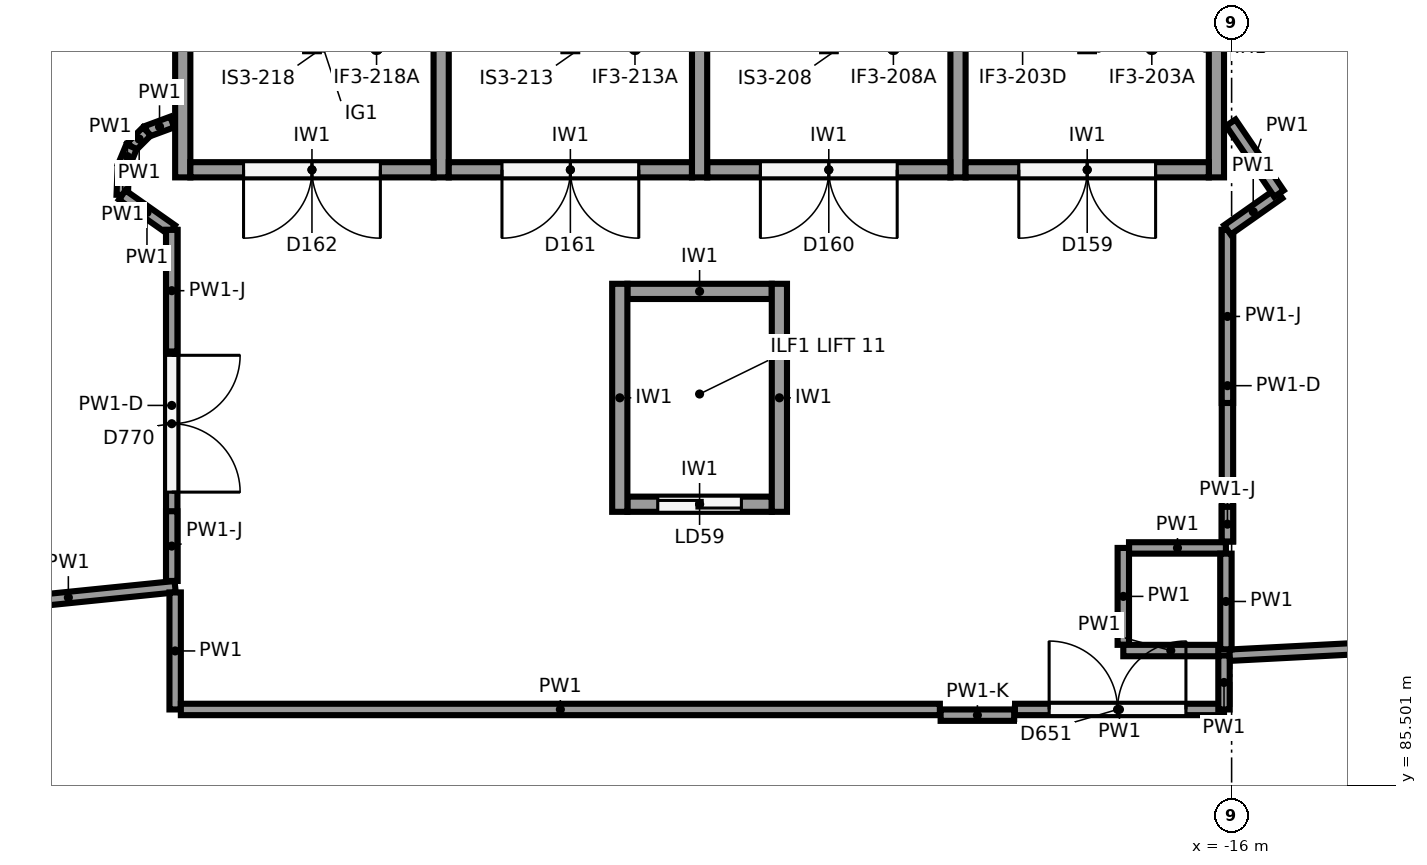
"""IFC4 building model, lengths in metres.
Left out: names, types, materials, properties, quantities, classifications, styles, units other than length and angle.
Written with IfcOpenShell. Run it as: python <this file> out.ifc"""

import sys

from ifc_helpers import new_model, si_unit, direction, frame, frame_2d, origin, origin_2d, place, context, subcontext, project, spatial, rectangle, circle, extrude, element, fill, save


model = new_model("IFC4")
c1 = context("Model", 3, precision=1e-05, world=origin(), true_north=direction((0.0, 1.0)))
c2 = subcontext(c1, "Body", "Model", "MODEL_VIEW")
j1 = project(units=[si_unit("LENGTHUNIT", "METRE"), si_unit("PLANEANGLEUNIT", "RADIAN")], contexts=[c1])
p1 = place(None, origin())
s1 = spatial("IfcSite", under=j1, at=p1, CompositionType="ELEMENT")
p2 = place(p1, origin())
s2 = spatial("IfcBuilding", under=s1, at=p2, CompositionType="ELEMENT")
p3 = place(p2, frame((0.0, 0.0, 6.5)))
s3 = spatial("IfcBuildingStorey", under=s2, at=p3, CompositionType="ELEMENT", Elevation=6.5)
p4 = place(p3, frame((-19.119, 85.698, 0.0), z_axis=(0.0, 0.0, 1.0), x_axis=(1.0, 0.0, 0.0)))
e1 = element("IfcColumn", 1, at=p4, inside=s3, PredefinedType="COLUMN", context=c2, shape_type="SweptSolid", body=[
    extrude(circle(Radius=0.4, at=origin_2d()), origin(), (0.0, 0.0, 1.0), 5.5),
])
p5 = place(p3, frame((-19.627, 89.904, 0.0), z_axis=(0.0, 0.0, 1.0), x_axis=(1.0, 0.0, 0.0)))
e2 = element("IfcColumn", 2, at=p5, inside=s3, PredefinedType="COLUMN", context=c2, shape_type="SweptSolid", body=[
    extrude(circle(Radius=0.55, at=origin_2d()), origin(), (0.0, 0.0, 1.0), 5.5),
])
p6 = place(p3, frame((-31.737, 85.377, 0.0), z_axis=(0.0, 0.0, 1.0), x_axis=(1.0, 0.0, 0.0)))
e3 = element("IfcColumn", 3, at=p6, inside=s3, PredefinedType="COLUMN", context=c2, shape_type="SweptSolid", body=[
    extrude(circle(Radius=0.4, at=origin_2d()), origin(), (0.0, 0.0, 1.0), 5.5),
])
for number, where, z_axis, x_axis in (
    (4, (-16.2, 102.3, 0.0), (0.0, 0.0, 1.0), (0.0, -1.0, 0.0)),
    (5, (-23.0, 102.3, 0.0), (0.0, 0.0, 1.0), (0.0, -1.0, 0.0)),
    (6, (-29.8, 102.3, 0.0), (0.0, 0.0, 1.0), (0.0, -1.0, 0.0)),
    (7, (-19.6, 102.3, 0.0), (0.0, 0.0, 1.0), (0.0, -1.0, 0.0)),
    (8, (-26.4, 102.3, 0.0), (0.0, 0.0, 1.0), (0.0, -1.0, 0.0)),
):
    element("IfcWall", number, at=place(p3, frame(where, z_axis=z_axis, x_axis=x_axis)), inside=s3, PredefinedType="SHEAR", context=c2, shape_type="SweptSolid", body=[
        extrude(rectangle(XDim=8.8, YDim=0.2, at=frame_2d((4.4, 0.0))), origin(), (0.0, 0.0, 1.0), 5.15),
    ])
p7 = place(p3, frame((-16.3, 93.6, 0.0), z_axis=(0.0, 0.0, 1.0), x_axis=(-1.0, 0.0, 0.0)))
e9 = element("IfcWall", 9, at=p7, inside=s3, PredefinedType="SHEAR", context=c2, shape_type="SweptSolid", body=[
    extrude(rectangle(XDim=3.2, YDim=0.2, at=frame_2d((1.6, 0.0))), origin(), (0.0, 0.0, 1.0), 5.15),
])
p8 = place(p7, frame((0.7, 0.0, 0.0)))
e10 = element("IfcOpeningElement", 10, at=p8, cuts=e9, PredefinedType="OPENING", context=c2, shape_type="SweptSolid", body=[
    extrude(rectangle(XDim=1.8, YDim=2.1, at=frame_2d((0.9, 1.05))), frame((0.0, 0.11, 0.0), z_axis=(0.0, -1.0, 0.0), x_axis=(1.0, 0.0, 0.0)), (0.0, 0.0, 1.0), 0.22),
])
p9 = place(p3, frame((-19.7, 93.6, 0.0), z_axis=(0.0, 0.0, 1.0), x_axis=(-1.0, 0.0, 0.0)))
e11 = element("IfcWall", 11, at=p9, inside=s3, PredefinedType="SHEAR", context=c2, shape_type="SweptSolid", body=[
    extrude(rectangle(XDim=3.2, YDim=0.2, at=frame_2d((1.6, 0.0))), origin(), (0.0, 0.0, 1.0), 5.15),
])
p10 = place(p9, frame((0.7, 0.0, 0.0)))
e12 = element("IfcOpeningElement", 12, at=p10, cuts=e11, PredefinedType="OPENING", context=c2, shape_type="SweptSolid", body=[
    extrude(rectangle(XDim=1.8, YDim=2.1, at=frame_2d((0.9, 1.05))), frame((0.0, 0.11, 0.0), z_axis=(0.0, -1.0, 0.0), x_axis=(1.0, 0.0, 0.0)), (0.0, 0.0, 1.0), 0.22),
])
p11 = place(p3, frame((-23.1, 93.6, 0.0), z_axis=(0.0, 0.0, 1.0), x_axis=(-1.0, 0.0, 0.0)))
e13 = element("IfcWall", 13, at=p11, inside=s3, PredefinedType="SHEAR", context=c2, shape_type="SweptSolid", body=[
    extrude(rectangle(XDim=3.2, YDim=0.2, at=frame_2d((1.6, 0.0))), origin(), (0.0, 0.0, 1.0), 5.15),
])
p12 = place(p11, frame((0.7, 0.0, 0.0)))
e14 = element("IfcOpeningElement", 14, at=p12, cuts=e13, PredefinedType="OPENING", context=c2, shape_type="SweptSolid", body=[
    extrude(rectangle(XDim=1.8, YDim=2.1, at=frame_2d((0.9, 1.05))), frame((0.0, 0.11, 0.0), z_axis=(0.0, -1.0, 0.0), x_axis=(1.0, 0.0, 0.0)), (0.0, 0.0, 1.0), 0.22),
])
p13 = place(p3, frame((-26.5, 93.6, 0.0), z_axis=(0.0, 0.0, 1.0), x_axis=(-1.0, 0.0, 0.0)))
e15 = element("IfcWall", 15, at=p13, inside=s3, PredefinedType="SHEAR", context=c2, shape_type="SweptSolid", body=[
    extrude(rectangle(XDim=3.2, YDim=0.2, at=frame_2d((1.6, 0.0))), origin(), (0.0, 0.0, 1.0), 5.15),
])
p14 = place(p13, frame((0.7, 0.0, 0.0)))
e16 = element("IfcOpeningElement", 16, at=p14, cuts=e15, PredefinedType="OPENING", context=c2, shape_type="SweptSolid", body=[
    extrude(rectangle(XDim=1.8, YDim=2.1, at=frame_2d((0.9, 1.05))), frame((0.0, 0.11, 0.0), z_axis=(0.0, -1.0, 0.0), x_axis=(1.0, 0.0, 0.0)), (0.0, 0.0, 1.0), 0.22),
])
for number, where, z_axis, x_axis in (
    (17, (-21.95, 92.1, 0.0), (0.0, 0.0, 1.0), (0.0, -1.0, 0.0)),
    (18, (-24.05, 92.1, 0.0), (0.0, 0.0, 1.0), (0.0, -1.0, 0.0)),
):
    element("IfcWall", number, at=place(p3, frame(where, z_axis=z_axis, x_axis=x_axis)), inside=s3, PredefinedType="SHEAR", context=c2, shape_type="SweptSolid", body=[
        extrude(rectangle(XDim=3.0, YDim=0.2, at=frame_2d((1.5, 0.0))), origin(), (0.0, 0.0, 1.0), 5.15),
    ])
p15 = place(p3, frame((-22.05, 92.0, 0.0), z_axis=(0.0, 0.0, 1.0), x_axis=(-1.0, 0.0, 0.0)))
e19 = element("IfcWall", 19, at=p15, inside=s3, PredefinedType="SHEAR", context=c2, shape_type="SweptSolid", body=[
    extrude(rectangle(XDim=1.9, YDim=0.2, at=frame_2d((0.95, 0.0))), origin(), (0.0, 0.0, 1.0), 5.15),
])
p16 = place(p3, frame((-22.05, 89.2, 0.0), z_axis=(0.0, 0.0, 1.0), x_axis=(-1.0, 0.0, 0.0)))
e20 = element("IfcWall", 20, at=p16, inside=s3, PredefinedType="SHEAR", context=c2, shape_type="SweptSolid", body=[
    extrude(rectangle(XDim=1.9, YDim=0.2, at=frame_2d((0.95, 0.0))), origin(), (0.0, 0.0, 1.0), 5.15),
])
p17 = place(p16, frame((0.4, 0.0, 0.0)))
e21 = element("IfcOpeningElement", 21, at=p17, cuts=e20, PredefinedType="OPENING", context=c2, shape_type="SweptSolid", body=[
    extrude(rectangle(XDim=1.1, YDim=2.1, at=frame_2d((0.55, 1.05))), frame((0.0, 0.11, 0.0), z_axis=(0.0, -1.0, 0.0), x_axis=(1.0, 0.0, 0.0)), (0.0, 0.0, 1.0), 0.22),
])
p18 = place(p3, frame((-18.851, 86.5, 0.0), z_axis=(0.0, 0.0, 1.0), x_axis=(1.0, 0.0, 0.0)))
e22 = element("IfcWall", 22, at=p18, inside=s3, PredefinedType="PARTITIONING", context=c2, shape_type="SweptSolid", body=[
    extrude(rectangle(XDim=2.751, YDim=0.15, at=frame_2d((1.375, 0.0))), origin(), (0.0, 0.0, 1.0), 5.15),
])
p19 = place(p18, frame((0.45, 0.0, 0.0)))
e23 = element("IfcOpeningElement", 23, at=p19, cuts=e22, PredefinedType="OPENING", context=c2, shape_type="SweptSolid", body=[
    extrude(rectangle(XDim=1.8, YDim=2.1, at=frame_2d((0.9, 1.05))), frame((0.0, 0.085, 0.0), z_axis=(0.0, -1.0, 0.0), x_axis=(1.0, 0.0, 0.0)), (0.0, 0.0, 1.0), 0.17),
])
p20 = place(p3, frame((-16.1, 86.5, 0.0), z_axis=(0.0, 0.0, 1.0), x_axis=(0.0, 1.0, 0.0)))
e24 = element("IfcWall", 24, at=p20, inside=s3, PredefinedType="PARTITIONING", context=c2, shape_type="SweptSolid", body=[
    extrude(rectangle(XDim=0.71, YDim=0.15, at=frame_2d((0.355, 0.0))), origin(), (0.0, 0.0, 1.0), 5.15),
])
p21 = place(p3, frame((-16.025, 87.214, 0.0), z_axis=(0.0, 0.0, 1.0), x_axis=(0.998660530851, 0.051741126006, 0.0)))
e25 = element("IfcWall", 25, at=p21, inside=s3, PredefinedType="PARTITIONING", context=c2, shape_type="SweptSolid", body=[
    extrude(rectangle(XDim=9.027, YDim=0.15, at=frame_2d((4.513, 0.0))), origin(), (0.0, 0.0, 1.0), 5.15),
])
p22 = place(p3, frame((-32.71, 87.83, 0.0), z_axis=(0.0, 0.0, 1.0), x_axis=(0.994882835279, 0.101035360476, 0.0)))
e26 = element("IfcWall", 26, at=p22, inside=s3, PredefinedType="PARTITIONING", context=c2, shape_type="SweptSolid", body=[
    extrude(rectangle(XDim=2.825, YDim=0.15, at=frame_2d((1.412, 0.0))), origin(), (0.0, 0.0, 1.0), 5.15),
])
p23 = place(p3, frame((-29.9, 88.04, 0.0), z_axis=(0.0, 0.0, 1.0), x_axis=(0.0, -1.0, 0.0)))
e27 = element("IfcWall", 27, at=p23, inside=s3, PredefinedType="PARTITIONING", context=c2, shape_type="SweptSolid", body=[
    extrude(rectangle(XDim=1.54, YDim=0.15, at=frame_2d((0.77, 0.0))), origin(), (0.0, 0.0, 1.0), 5.15),
])
p24 = place(p3, frame((-29.825, 86.5, 0.0), z_axis=(0.0, 0.0, 1.0), x_axis=(1.0, 0.0, 0.0)))
e28 = element("IfcWall", 28, at=p24, inside=s3, PredefinedType="PARTITIONING", context=c2, shape_type="SweptSolid", body=[
    extrude(rectangle(XDim=9.986, YDim=0.15, at=frame_2d((4.993, 0.0))), origin(), (0.0, 0.0, 1.0), 5.15),
])
p25 = place(p3, frame((-16.075, 88.625, 0.0), z_axis=(0.0, 0.0, 1.0), x_axis=(-1.0, 0.0, 0.0)))
e29 = element("IfcWall", 29, at=p25, inside=s3, PredefinedType="PARTITIONING", context=c2, shape_type="SweptSolid", body=[
    extrude(rectangle(XDim=1.275, YDim=0.15, at=frame_2d((0.638, 0.0))), origin(), (0.0, 0.0, 1.0), 5.15),
])
p26 = place(p3, frame((-17.425, 88.625, 0.0), z_axis=(0.0, 0.0, 1.0), x_axis=(0.0, -1.0, 0.0)))
e30 = element("IfcWall", 30, at=p26, inside=s3, PredefinedType="PARTITIONING", context=c2, shape_type="SweptSolid", body=[
    extrude(rectangle(XDim=1.275, YDim=0.15, at=frame_2d((0.637, 0.0))), origin(), (0.0, 0.0, 1.0), 5.15),
])
p27 = place(p3, frame((-17.425, 87.275, 0.0), z_axis=(0.0, 0.0, 1.0), x_axis=(1.0, 0.0, 0.0)))
e31 = element("IfcWall", 31, at=p27, inside=s3, PredefinedType="PARTITIONING", context=c2, shape_type="SweptSolid", body=[
    extrude(rectangle(XDim=1.249, YDim=0.15, at=frame_2d((0.625, 0.0))), origin(), (0.0, 0.0, 1.0), 5.15),
])
p28 = place(p3, frame((-16.075, 87.291, 0.0), z_axis=(0.0, 0.0, 1.0), x_axis=(0.0, 1.0, 0.0)))
e32 = element("IfcWall", 32, at=p28, inside=s3, PredefinedType="PARTITIONING", context=c2, shape_type="SweptSolid", body=[
    extrude(rectangle(XDim=1.259, YDim=0.15, at=frame_2d((0.629, 0.0))), origin(), (0.0, 0.0, 1.0), 5.15),
])
p29 = place(p3, frame((-29.938, 94.229, 0.0), z_axis=(0.0, 0.0, 1.0), x_axis=(-0.937674325327, -0.347515265308, 0.0)))
e33 = element("IfcWall", 33, at=p29, inside=s3, PredefinedType="PARTITIONING", context=c2, shape_type="SweptSolid", body=[
    extrude(rectangle(XDim=0.356, YDim=0.15, at=frame_2d((0.178, 0.0))), origin(), (0.0, 0.0, 1.0), 5.15),
])
p30 = place(p3, frame((-30.272, 94.105, 0.0), z_axis=(0.0, 0.0, 1.0), x_axis=(-0.707534941396, -0.706678361564, 0.0)))
e34 = element("IfcWall", 34, at=p30, inside=s3, PredefinedType="PARTITIONING", context=c2, shape_type="SweptSolid", body=[
    extrude(rectangle(XDim=0.285, YDim=0.15, at=frame_2d((0.143, 0.0))), origin(), (0.0, 0.0, 1.0), 5.15),
])
p31 = place(p3, frame((-30.474, 93.904, 0.0), z_axis=(0.0, 0.0, 1.0), x_axis=(-0.382275228123, -0.924048510611, 0.0)))
e35 = element("IfcWall", 35, at=p31, inside=s3, PredefinedType="PARTITIONING", context=c2, shape_type="SweptSolid", body=[
    extrude(rectangle(XDim=0.282, YDim=0.15, at=frame_2d((0.141, 0.0))), origin(), (0.0, 0.0, 1.0), 5.15),
])
p32 = place(p3, frame((-30.582, 93.643, 0.0), z_axis=(0.0, 0.0, 1.0), x_axis=(-0.038982051143, -0.999239910977, 0.0)))
e36 = element("IfcWall", 36, at=p32, inside=s3, PredefinedType="PARTITIONING", context=c2, shape_type="SweptSolid", body=[
    extrude(rectangle(XDim=0.376, YDim=0.15, at=frame_2d((0.188, 0.0))), origin(), (0.0, 0.0, 1.0), 5.15),
])
p33 = place(p3, frame((-30.596, 93.268, 0.0), z_axis=(0.0, 0.0, 1.0), x_axis=(0.817731616096, -0.57559969079, 0.0)))
e37 = element("IfcWall", 37, at=p33, inside=s3, PredefinedType="PARTITIONING", context=c2, shape_type="SweptSolid", body=[
    extrude(rectangle(XDim=0.797, YDim=0.15, at=frame_2d((0.398, 0.0))), origin(), (0.0, 0.0, 1.0), 5.15),
])
p34 = place(p3, frame((-29.945, 92.809, 0.0), z_axis=(0.0, 0.0, 1.0), x_axis=(0.0, -1.0, 0.0)))
e38 = element("IfcWall", 38, at=p34, inside=s3, PredefinedType="PARTITIONING", context=c2, shape_type="SweptSolid", body=[
    extrude(rectangle(XDim=4.619, YDim=0.15, at=frame_2d((2.309, 0.0))), origin(), (0.0, 0.0, 1.0), 3.85),
])
p35 = place(p34, frame((1.65, 0.0, 0.0)))
e39 = element("IfcOpeningElement", 39, at=p35, cuts=e38, PredefinedType="OPENING", context=c2, shape_type="SweptSolid", body=[
    extrude(rectangle(XDim=1.8, YDim=2.1, at=frame_2d((0.9, 1.05))), frame((0.0, 0.085, 0.0), z_axis=(0.0, -1.0, 0.0), x_axis=(1.0, 0.0, 0.0)), (0.0, 0.0, 1.0), 0.17),
])
p36 = place(p3, frame((-29.945, 92.809, 3.85), z_axis=(0.0, 0.0, 1.0), x_axis=(0.0, -1.0, 0.0)))
e40 = element("IfcWall", 40, at=p36, inside=s3, PredefinedType="PARTITIONING", context=c2, shape_type="SweptSolid", body=[
    extrude(rectangle(XDim=1.6, YDim=0.15, at=frame_2d((0.8, 0.0))), origin(), (0.0, 0.0, 1.0), 1.3),
])
p37 = place(p3, frame((-29.945, 89.108, 3.85), z_axis=(0.0, 0.0, 1.0), x_axis=(0.0, -1.0, 0.0)))
e41 = element("IfcWall", 41, at=p37, inside=s3, PredefinedType="PARTITIONING", context=c2, shape_type="SweptSolid", body=[
    extrude(rectangle(XDim=0.917, YDim=0.15, at=frame_2d((0.458, 0.0))), origin(), (0.0, 0.0, 1.0), 1.3),
])
p38 = place(p3, frame((-19.829, 86.425, 0.0), z_axis=(0.0, 0.0, 1.0), x_axis=(1.0, 0.0, 0.0)))
e42 = element("IfcWall", 42, at=p38, inside=s3, PredefinedType="PARTITIONING", context=c2, shape_type="SweptSolid", body=[
    extrude(rectangle(XDim=0.968, YDim=0.15, at=frame_2d((0.484, 0.0))), origin(), (0.0, 0.0, 1.0), 4.4),
])
p39 = place(p3, frame((-16.055, 88.71, 0.0), z_axis=(0.0, 0.0, 1.0), x_axis=(0.0, 1.0, 0.0)))
e43 = element("IfcWall", 43, at=p39, inside=s3, PredefinedType="PARTITIONING", context=c2, shape_type="SweptSolid", body=[
    extrude(rectangle(XDim=4.099, YDim=0.15, at=frame_2d((2.05, 0.0))), origin(), (0.0, 0.0, 1.0), 3.85),
])
p40 = place(p3, frame((-16.055, 88.71, 3.85), z_axis=(0.0, 0.0, 1.0), x_axis=(0.0, 1.0, 0.0)))
e44 = element("IfcWall", 44, at=p40, inside=s3, PredefinedType="PARTITIONING", context=c2, shape_type="SweptSolid", body=[
    extrude(rectangle(XDim=0.456, YDim=0.15, at=frame_2d((0.228, 0.0))), origin(), (0.0, 0.0, 1.0), 1.3),
])
p41 = place(p3, frame((-16.055, 90.532, 3.85), z_axis=(0.0, 0.0, 1.0), x_axis=(0.0, 1.0, 0.0)))
e45 = element("IfcWall", 45, at=p41, inside=s3, PredefinedType="PARTITIONING", context=c2, shape_type="SweptSolid", body=[
    extrude(rectangle(XDim=2.277, YDim=0.15, at=frame_2d((1.139, 0.0))), origin(), (0.0, 0.0, 1.0), 1.3),
])
p42 = place(p3, frame((-16.055, 92.809, 0.0), z_axis=(0.0, 0.0, 1.0), x_axis=(0.81774999294, 0.575573582652, 0.0)))
e46 = element("IfcWall", 46, at=p42, inside=s3, PredefinedType="PARTITIONING", context=c2, shape_type="SweptSolid", body=[
    extrude(rectangle(XDim=0.83, YDim=0.15, at=frame_2d((0.415, 0.0))), origin(), (0.0, 0.0, 1.0), 5.15),
])
p43 = place(p3, frame((-15.376, 93.287, 0.0), z_axis=(0.0, 0.0, 1.0), x_axis=(-0.562120553728, 0.827055308354, 0.0)))
e47 = element("IfcWall", 47, at=p43, inside=s3, PredefinedType="PARTITIONING", context=c2, shape_type="SweptSolid", body=[
    extrude(rectangle(XDim=1.128, YDim=0.15, at=frame_2d((0.564, 0.0))), origin(), (0.0, 0.0, 1.0), 5.15),
])
p44 = place(p8, origin())
e48 = element("IfcDoor", 48, at=p44, inside=s3, OperationType="DOUBLE_DOOR_SINGLE_SWING", PredefinedType="DOOR", context=c2, shape_type="SweptSolid", body=[
    extrude(rectangle(XDim=1.8, YDim=2.1, at=frame_2d((0.9, 1.05))), frame((0.0, 0.025, 0.0), z_axis=(0.0, -1.0, 0.0), x_axis=(1.0, 0.0, 0.0)), (0.0, 0.0, 1.0), 0.05),
])
fill(e10, e48)
p45 = place(p10, origin())
e49 = element("IfcDoor", 49, at=p45, inside=s3, OperationType="DOUBLE_DOOR_SINGLE_SWING", PredefinedType="DOOR", context=c2, shape_type="SweptSolid", body=[
    extrude(rectangle(XDim=1.8, YDim=2.1, at=frame_2d((0.9, 1.05))), frame((0.0, 0.025, 0.0), z_axis=(0.0, -1.0, 0.0), x_axis=(1.0, 0.0, 0.0)), (0.0, 0.0, 1.0), 0.05),
])
fill(e12, e49)
p46 = place(p12, origin())
e50 = element("IfcDoor", 50, at=p46, inside=s3, OperationType="DOUBLE_DOOR_SINGLE_SWING", PredefinedType="DOOR", context=c2, shape_type="SweptSolid", body=[
    extrude(rectangle(XDim=1.8, YDim=2.1, at=frame_2d((0.9, 1.05))), frame((0.0, 0.025, 0.0), z_axis=(0.0, -1.0, 0.0), x_axis=(1.0, 0.0, 0.0)), (0.0, 0.0, 1.0), 0.05),
])
fill(e14, e50)
p47 = place(p14, origin())
e51 = element("IfcDoor", 51, at=p47, inside=s3, OperationType="DOUBLE_DOOR_SINGLE_SWING", PredefinedType="DOOR", context=c2, shape_type="SweptSolid", body=[
    extrude(rectangle(XDim=1.8, YDim=2.1, at=frame_2d((0.9, 1.05))), frame((0.0, 0.025, 0.0), z_axis=(0.0, -1.0, 0.0), x_axis=(1.0, 0.0, 0.0)), (0.0, 0.0, 1.0), 0.05),
])
fill(e16, e51)
p48 = place(p17, origin())
e52 = element("IfcDoor", 52, at=p48, inside=s3, OperationType="SLIDING_TO_LEFT", PredefinedType="DOOR", context=c2, shape_type="SweptSolid", body=[
    extrude(rectangle(XDim=1.1, YDim=2.1, at=frame_2d((0.55, 1.05))), frame((0.0, 0.025, 0.0), z_axis=(0.0, -1.0, 0.0), x_axis=(1.0, 0.0, 0.0)), (0.0, 0.0, 1.0), 0.05),
])
fill(e21, e52)
p49 = place(p19, origin())
e53 = element("IfcDoor", 53, at=p49, inside=s3, OperationType="DOUBLE_DOOR_SINGLE_SWING", PredefinedType="DOOR", context=c2, shape_type="SweptSolid", body=[
    extrude(rectangle(XDim=1.8, YDim=2.1, at=frame_2d((0.9, 1.05))), frame((0.0, 0.025, 0.0), z_axis=(0.0, -1.0, 0.0), x_axis=(1.0, 0.0, 0.0)), (0.0, 0.0, 1.0), 0.05),
])
fill(e23, e53)
p50 = place(p35, origin())
e54 = element("IfcDoor", 54, at=p50, inside=s3, OperationType="DOUBLE_DOOR_SINGLE_SWING", PredefinedType="DOOR", context=c2, shape_type="SweptSolid", body=[
    extrude(rectangle(XDim=1.8, YDim=2.1, at=frame_2d((0.9, 1.05))), frame((0.0, 0.025, 0.0), z_axis=(0.0, -1.0, 0.0), x_axis=(1.0, 0.0, 0.0)), (0.0, 0.0, 1.0), 0.05),
])
fill(e39, e54)
save(model, sys.argv[1])
